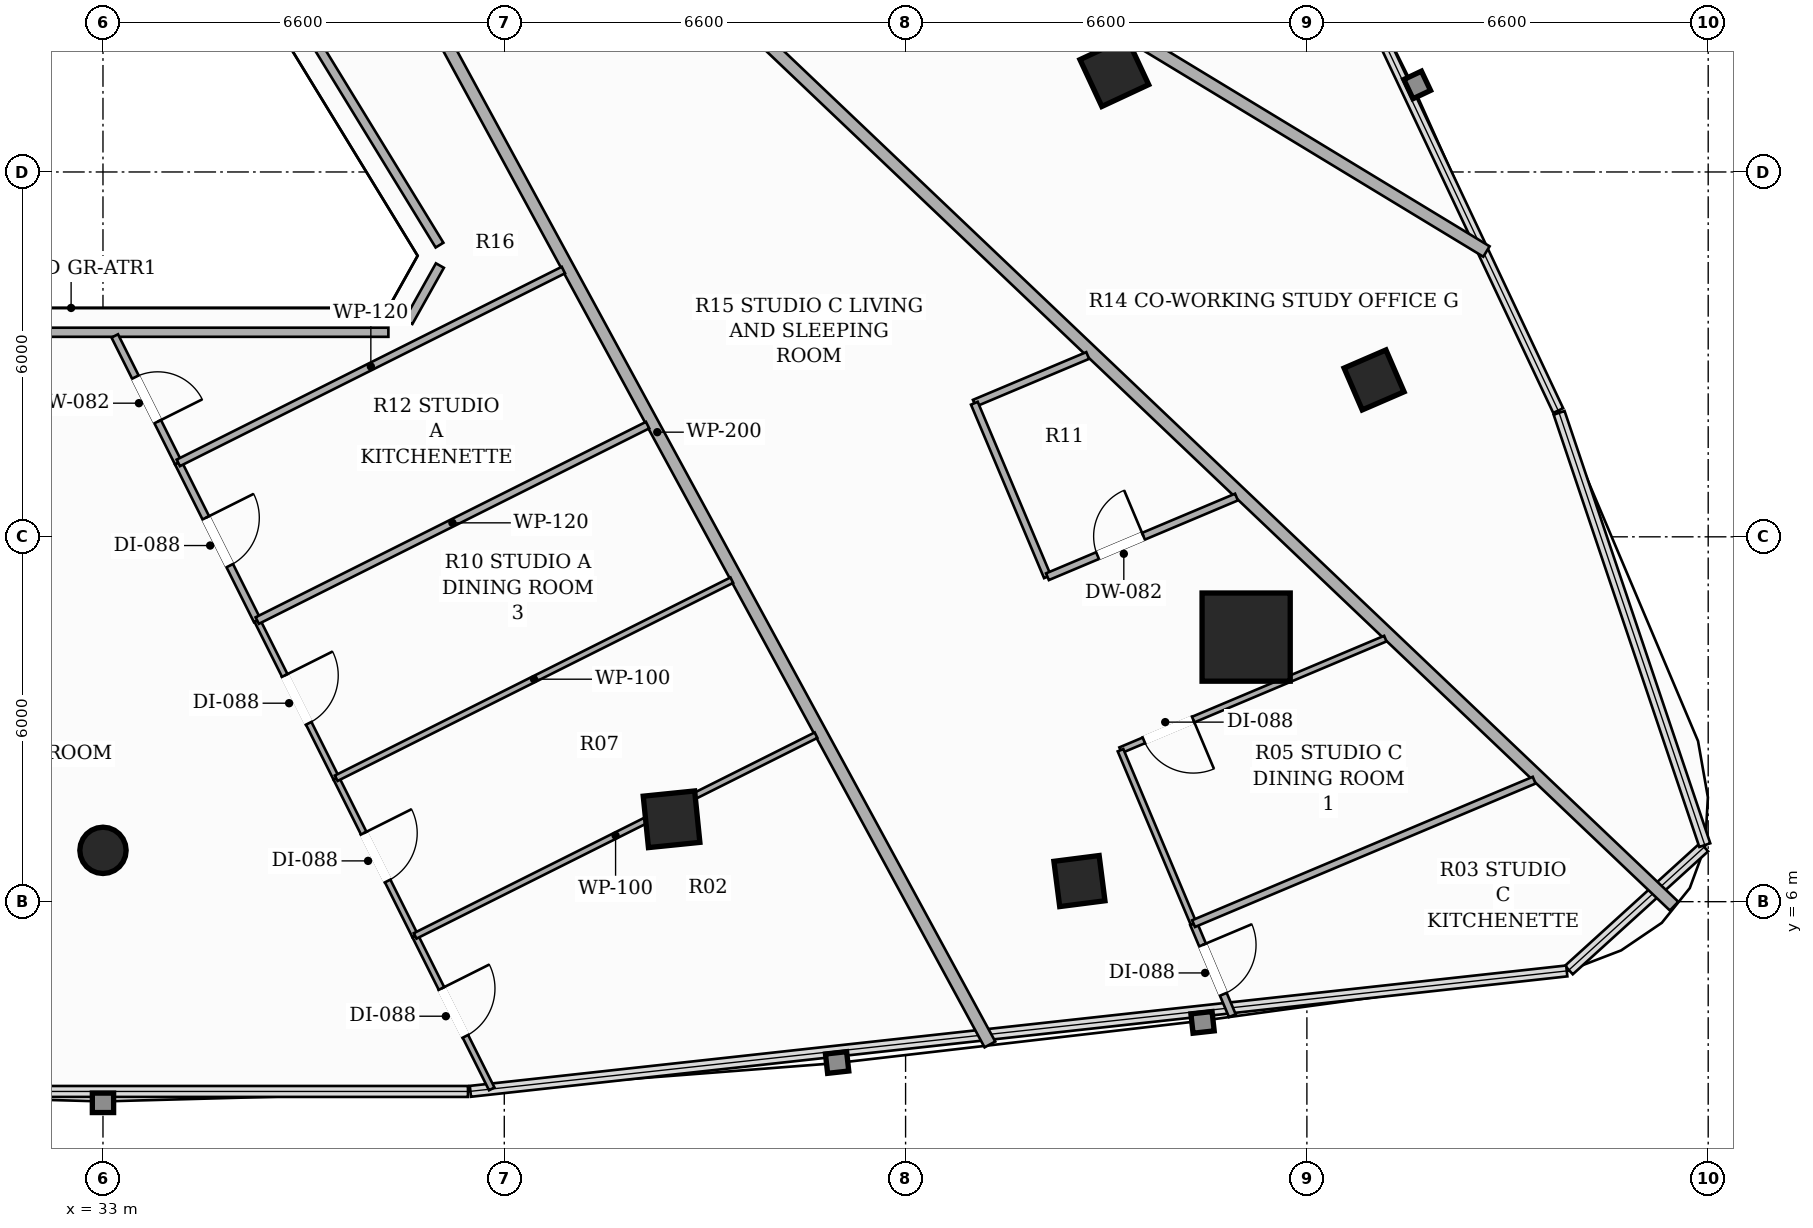
"""IFC4 building model, lengths in metres.
Left out: names, types, materials, properties, quantities, classifications, styles, units other than length and angle.
Written with IfcOpenShell. Run it as: python <this file> out.ifc"""

import sys

from ifc_helpers import new_model, si_unit, direction, frame, frame_2d, origin, origin_2d, place, context, subcontext, project, spatial, rectangle, hollow_rectangle, hollow_circle, extrude, element, fill, save


model = new_model("IFC4")
c1 = context("Model", 3, precision=1e-05, world=origin(), true_north=direction((0.0, 1.0)))
c2 = subcontext(c1, "Body", "Model", "MODEL_VIEW")
j1 = project(units=[si_unit("LENGTHUNIT", "METRE"), si_unit("PLANEANGLEUNIT", "RADIAN")], contexts=[c1])
p1 = place(None, origin())
s1 = spatial("IfcSite", under=j1, at=p1, CompositionType="ELEMENT")
p2 = place(p1, origin())
s2 = spatial("IfcBuilding", under=s1, at=p2, CompositionType="ELEMENT")
p3 = place(p2, frame((0.0, 0.0, 113.3)))
s3 = spatial("IfcBuildingStorey", under=s2, at=p3, CompositionType="ELEMENT", Elevation=113.3)
p4 = place(p3, frame((51.801, 10.351, 0.0), z_axis=(0.0, 0.0, 1.0), x_axis=(1.0, 0.0, 0.0)))
e1 = element("IfcColumn", 1, at=p4, inside=s3, PredefinedType="COLUMN", context=c2, shape_type="SweptSolid", body=[
    extrude(hollow_rectangle(XDim=1.45, YDim=1.45, WallThickness=0.045, at=origin_2d()), origin(), (0.0, 0.0, 1.0), 3.3),
])
p5 = place(p3, frame((33.0, 6.844, 0.0), z_axis=(0.0, 0.0, 1.0), x_axis=(1.0, 0.0, 0.0)))
e2 = element("IfcColumn", 2, at=p5, inside=s3, PredefinedType="COLUMN", context=c2, shape_type="SweptSolid", body=[
    extrude(hollow_circle(Radius=0.381, WallThickness=0.022, at=origin_2d()), origin(), (0.0, 0.0, 1.0), 3.3),
])
for number, where, z_axis, x_axis in (
    (3, (42.351, 7.355, 0.0), (0.0, 0.0, 1.0), (0.995, 0.101, 0.0)),
    (4, (49.633, 19.642, 0.0), (0.0, 0.0, 1.0), (-0.423, 0.906, 0.0)),
):
    element("IfcColumn", number, at=place(p3, frame(where, z_axis=z_axis, x_axis=x_axis)), inside=s3, PredefinedType="COLUMN", context=c2, shape_type="SweptSolid", body=[
        extrude(hollow_rectangle(XDim=0.85, YDim=0.85, WallThickness=0.028, at=origin_2d()), origin(), (0.0, 0.0, 1.0), 3.3),
    ])
for number, where, z_axis, x_axis in (
    (5, (49.059, 6.339, 0.0), (0.0, 0.0, 1.0), (0.992, 0.127, 0.0)),
    (6, (53.905, 14.58, 0.0), (0.0, 0.0, 1.0), (-0.397, 0.918, 0.0)),
):
    element("IfcColumn", number, at=place(p3, frame(where, z_axis=z_axis, x_axis=x_axis)), inside=s3, PredefinedType="COLUMN", context=c2, shape_type="SweptSolid", body=[
        extrude(hollow_rectangle(XDim=0.75, YDim=0.75, WallThickness=0.025, at=origin_2d()), origin(), (0.0, 0.0, 1.0), 3.3),
    ])
p6 = place(p3, frame((34.257, 23.79, 0.0), z_axis=(0.0, 0.0, 1.0), x_axis=(0.521839061235, -0.853043957935, 0.0)))
e7 = element("IfcWall", 7, at=p6, inside=s3, PredefinedType="PARTITIONING", context=c2, shape_type="SweptSolid", body=[
    extrude(rectangle(XDim=8.198, YDim=0.15, at=frame_2d((4.099, 0.0))), origin(), (0.0, 0.0, 1.0), 2.721),
])
p7 = place(p3, frame((38.541, 16.461, 0.0), z_axis=(0.0, 0.0, 1.0), x_axis=(-0.488631416095, -0.872490308946, 0.0)))
e8 = element("IfcWall", 8, at=p7, inside=s3, PredefinedType="PARTITIONING", context=c2, shape_type="SweptSolid", body=[
    extrude(rectangle(XDim=1.06, YDim=0.15, at=frame_2d((0.53, 0.0))), origin(), (0.0, 0.0, 1.0), 3.06),
])
p8 = place(p3, frame((37.694, 15.364, 0.0), z_axis=(0.0, 0.0, 1.0), x_axis=(-1.0, 0.0, 0.0)))
e9 = element("IfcWall", 9, at=p8, inside=s3, PredefinedType="PARTITIONING", context=c2, shape_type="SweptSolid", body=[
    extrude(rectangle(XDim=9.388, YDim=0.15, at=frame_2d((4.694, 0.0))), origin(), (0.0, 0.0, 1.0), 2.721),
])
p9 = place(p3, frame((36.646, 23.79, 0.0), z_axis=(0.0, 0.0, 1.0), x_axis=(0.477391569207, -0.878690667784, 0.0)))
e10 = element("IfcWall", 10, at=p9, inside=s3, PredefinedType="PARTITIONING", context=c2, shape_type="SweptSolid", body=[
    extrude(rectangle(XDim=22.918, YDim=0.2, at=frame_2d((11.459, 0.0))), origin(), (0.0, 0.0, 1.0), 2.413),
])
p10 = place(p3, frame((40.056, 23.79, 0.0), z_axis=(0.0, 0.0, 1.0), x_axis=(0.724633427165, -0.68913452695, 0.0)))
e11 = element("IfcWall", 11, at=p10, inside=s3, PredefinedType="PARTITIONING", context=c2, shape_type="SweptSolid", body=[
    extrude(rectangle(XDim=25.921, YDim=0.2, at=frame_2d((12.96, 0.0))), origin(), (0.0, 0.0, 1.0), 2.413),
])
p11 = place(p3, frame((55.753, 16.692, 0.0), z_axis=(0.0, 0.0, 1.0), x_axis=(-0.85489976131, 0.518793213248, 0.0)))
e12 = element("IfcWall", 12, at=p11, inside=s3, PredefinedType="PARTITIONING", context=c2, shape_type="SweptSolid", body=[
    extrude(rectangle(XDim=15.608, YDim=0.2, at=frame_2d((7.804, 0.0))), origin(), (0.0, 0.0, 1.0), 2.413),
])
p12 = place(p3, frame((33.194, 15.304, 0.0), z_axis=(0.0, 0.0, 1.0), x_axis=(0.447548179666, -0.894259820677, 0.0)))
e13 = element("IfcWall", 13, at=p12, inside=s3, PredefinedType="PARTITIONING", context=c2, shape_type="SweptSolid", body=[
    extrude(rectangle(XDim=2.335, YDim=0.12, at=frame_2d((1.167, 0.0))), origin(), (0.0, 0.0, 1.0), 2.721),
])
p13 = place(p12, frame((0.757, 0.0, 0.0)))
e14 = element("IfcOpeningElement", 14, at=p13, cuts=e13, PredefinedType="OPENING", context=c2, shape_type="SweptSolid", body=[
    extrude(rectangle(XDim=0.82, YDim=2.1, at=frame_2d((0.41, 1.05))), frame((0.0, 0.07, 0.0), z_axis=(0.0, -1.0, 0.0), x_axis=(1.0, 0.0, 0.0)), (0.0, 0.0, 1.0), 0.14),
])
p14 = place(p3, frame((34.239, 13.216, 0.0), z_axis=(0.0, 0.0, 1.0), x_axis=(0.447651342751, -0.894208183441, 0.0)))
e15 = element("IfcWall", 15, at=p14, inside=s3, PredefinedType="PARTITIONING", context=c2, shape_type="SweptSolid", body=[
    extrude(rectangle(XDim=2.9, YDim=0.12, at=frame_2d((1.45, 0.0))), origin(), (0.0, 0.0, 1.0), 3.06),
])
p15 = place(p14, frame((1.01, 0.0, 0.0)))
e16 = element("IfcOpeningElement", 16, at=p15, cuts=e15, PredefinedType="OPENING", context=c2, shape_type="SweptSolid", body=[
    extrude(rectangle(XDim=0.88, YDim=2.1, at=frame_2d((0.44, 1.05))), frame((0.0, 0.07, 0.0), z_axis=(0.0, -1.0, 0.0), x_axis=(1.0, 0.0, 0.0)), (0.0, 0.0, 1.0), 0.14),
])
p16 = place(p3, frame((38.134, 5.437, 0.0), z_axis=(0.0, 0.0, 1.0), x_axis=(0.447768773835, -0.894149386388, 0.0)))
e17 = element("IfcWall", 17, at=p16, inside=s3, PredefinedType="PARTITIONING", context=c2, shape_type="SweptSolid", body=[
    extrude(rectangle(XDim=2.814, YDim=0.1, at=frame_2d((1.407, 0.0))), origin(), (0.0, 0.0, 1.0), 3.06),
])
p17 = place(p16, frame((0.967, 0.0, 0.0)))
e18 = element("IfcOpeningElement", 18, at=p17, cuts=e17, PredefinedType="OPENING", context=c2, shape_type="SweptSolid", body=[
    extrude(rectangle(XDim=0.88, YDim=2.1, at=frame_2d((0.44, 1.05))), frame((0.0, 0.06, 0.0), z_axis=(0.0, -1.0, 0.0), x_axis=(1.0, 0.0, 0.0)), (0.0, 0.0, 1.0), 0.12),
])
p18 = place(p3, frame((36.836, 8.03, 0.0), z_axis=(0.0, 0.0, 1.0), x_axis=(0.447651342751, -0.894208183441, 0.0)))
e19 = element("IfcWall", 19, at=p18, inside=s3, PredefinedType="PARTITIONING", context=c2, shape_type="SweptSolid", body=[
    extrude(rectangle(XDim=2.9, YDim=0.1, at=frame_2d((1.45, 0.0))), origin(), (0.0, 0.0, 1.0), 2.413),
])
p19 = place(p18, frame((1.01, 0.0, 0.0)))
e20 = element("IfcOpeningElement", 20, at=p19, cuts=e19, PredefinedType="OPENING", context=c2, shape_type="SweptSolid", body=[
    extrude(rectangle(XDim=0.88, YDim=2.1, at=frame_2d((0.44, 1.05))), frame((0.0, 0.06, 0.0), z_axis=(0.0, -1.0, 0.0), x_axis=(1.0, 0.0, 0.0)), (0.0, 0.0, 1.0), 0.12),
])
p20 = place(p3, frame((35.537, 10.623, 0.0), z_axis=(0.0, 0.0, 1.0), x_axis=(0.447853271476, -0.894107066983, 0.0)))
e21 = element("IfcWall", 21, at=p20, inside=s3, PredefinedType="PARTITIONING", context=c2, shape_type="SweptSolid", body=[
    extrude(rectangle(XDim=2.9, YDim=0.1, at=frame_2d((1.45, 0.0))), origin(), (0.0, 0.0, 1.0), 3.06),
])
p21 = place(p20, frame((1.01, 0.0, 0.0)))
e22 = element("IfcOpeningElement", 22, at=p21, cuts=e21, PredefinedType="OPENING", context=c2, shape_type="SweptSolid", body=[
    extrude(rectangle(XDim=0.88, YDim=2.1, at=frame_2d((0.44, 1.05))), frame((0.0, 0.06, 0.0), z_axis=(0.0, -1.0, 0.0), x_axis=(1.0, 0.0, 0.0)), (0.0, 0.0, 1.0), 0.12),
])
p22 = place(p3, frame((40.572, 16.387, 0.0), z_axis=(0.0, 0.0, 1.0), x_axis=(-0.894178861749, -0.447709909653, 0.0)))
e23 = element("IfcWall", 23, at=p22, inside=s3, PredefinedType="PARTITIONING", context=c2, shape_type="SweptSolid", body=[
    extrude(rectangle(XDim=7.083, YDim=0.12, at=frame_2d((3.541, 0.0))), origin(), (0.0, 0.0, 1.0), 2.721),
])
p23 = place(p3, frame((41.957, 13.837, 0.0), z_axis=(0.0, 0.0, 1.0), x_axis=(-0.894209449688, -0.447648813344, 0.0)))
e24 = element("IfcWall", 24, at=p23, inside=s3, PredefinedType="PARTITIONING", context=c2, shape_type="SweptSolid", body=[
    extrude(rectangle(XDim=7.179, YDim=0.12, at=frame_2d((3.59, 0.0))), origin(), (0.0, 0.0, 1.0), 2.721),
])
p24 = place(p3, frame((38.134, 5.437, 0.0), z_axis=(0.0, 0.0, 1.0), x_axis=(0.894182030014, 0.447703581849, 0.0)))
e25 = element("IfcWall", 25, at=p24, inside=s3, PredefinedType="PARTITIONING", context=c2, shape_type="SweptSolid", body=[
    extrude(rectangle(XDim=7.373, YDim=0.1, at=frame_2d((3.687, 0.0))), origin(), (0.0, 0.0, 1.0), 2.413),
])
p25 = place(p3, frame((36.836, 8.03, 0.0), z_axis=(0.0, 0.0, 1.0), x_axis=(0.894205618721, 0.447656465884, 0.0)))
e26 = element("IfcWall", 26, at=p25, inside=s3, PredefinedType="PARTITIONING", context=c2, shape_type="SweptSolid", body=[
    extrude(rectangle(XDim=7.276, YDim=0.1, at=frame_2d((3.638, 0.0))), origin(), (0.0, 0.0, 1.0), 2.721),
])
p26 = place(p3, frame((49.195, 14.982, 0.0), z_axis=(0.0, 0.0, 1.0), x_axis=(-0.921624013763, -0.38808398222, 0.0)))
e27 = element("IfcWall", 27, at=p26, inside=s3, PredefinedType="PARTITIONING", context=c2, shape_type="SweptSolid", body=[
    extrude(rectangle(XDim=2.022, YDim=0.12, at=frame_2d((1.011, 0.0))), origin(), (0.0, 0.0, 1.0), 2.492),
])
p27 = place(p3, frame((47.331, 14.197, 0.0), z_axis=(0.0, 0.0, 1.0), x_axis=(0.388229743903, -0.921562621827, 0.0)))
e28 = element("IfcWall", 28, at=p27, inside=s3, PredefinedType="PARTITIONING", context=c2, shape_type="SweptSolid", body=[
    extrude(rectangle(XDim=3.096, YDim=0.12, at=frame_2d((1.548, 0.0))), origin(), (0.0, 0.0, 1.0), 3.06),
])
p28 = place(p3, frame((48.533, 11.344, 0.0), z_axis=(0.0, 0.0, 1.0), x_axis=(0.921534547548, 0.388296378653, 0.0)))
e29 = element("IfcWall", 29, at=p28, inside=s3, PredefinedType="PARTITIONING", context=c2, shape_type="SweptSolid", body=[
    extrude(rectangle(XDim=3.374, YDim=0.12, at=frame_2d((1.687, 0.0))), origin(), (0.0, 0.0, 1.0), 2.492),
])
p29 = place(p28, frame((0.894, 0.0, 0.0)))
e30 = element("IfcOpeningElement", 30, at=p29, cuts=e29, PredefinedType="OPENING", context=c2, shape_type="SweptSolid", body=[
    extrude(rectangle(XDim=0.82, YDim=2.1, at=frame_2d((0.41, 1.05))), frame((0.0, 0.07, 0.0), z_axis=(0.0, -1.0, 0.0), x_axis=(1.0, 0.0, 0.0)), (0.0, 0.0, 1.0), 0.14),
])
p30 = place(p3, frame((50.936, 5.639, 0.0), z_axis=(0.0, 0.0, 1.0), x_axis=(0.3883160894, -0.92152624201, 0.0)))
e31 = element("IfcWall", 31, at=p30, inside=s3, PredefinedType="PARTITIONING", context=c2, shape_type="SweptSolid", body=[
    extrude(rectangle(XDim=1.643, YDim=0.12, at=frame_2d((0.821, 0.0))), origin(), (0.0, 0.0, 1.0), 2.619),
])
p31 = place(p30, frame((0.381, 0.0, 0.0)))
e32 = element("IfcOpeningElement", 32, at=p31, cuts=e31, PredefinedType="OPENING", context=c2, shape_type="SweptSolid", body=[
    extrude(rectangle(XDim=0.88, YDim=2.1, at=frame_2d((0.44, 1.05))), frame((0.0, 0.07, 0.0), z_axis=(0.0, -1.0, 0.0), x_axis=(1.0, 0.0, 0.0)), (0.0, 0.0, 1.0), 0.14),
])
p32 = place(p3, frame((54.09, 10.326, 0.0), z_axis=(0.0, 0.0, 1.0), x_axis=(-0.921538100995, -0.388287945234, 0.0)))
e33 = element("IfcWall", 33, at=p32, inside=s3, PredefinedType="PARTITIONING", context=c2, shape_type="SweptSolid", body=[
    extrude(rectangle(XDim=4.726, YDim=0.1, at=frame_2d((2.363, 0.0))), origin(), (0.0, 0.0, 1.0), 2.413),
])
p33 = place(p32, frame((3.429, 0.0, 0.0)))
e34 = element("IfcOpeningElement", 34, at=p33, cuts=e33, PredefinedType="OPENING", context=c2, shape_type="SweptSolid", body=[
    extrude(rectangle(XDim=0.88, YDim=2.1, at=frame_2d((0.44, 1.05))), frame((0.0, 0.06, 0.0), z_axis=(0.0, -1.0, 0.0), x_axis=(1.0, 0.0, 0.0)), (0.0, 0.0, 1.0), 0.12),
])
p34 = place(p3, frame((49.735, 8.491, 0.0), z_axis=(0.0, 0.0, 1.0), x_axis=(0.388074634892, -0.921627949746, 0.0)))
e35 = element("IfcWall", 35, at=p34, inside=s3, PredefinedType="PARTITIONING", context=c2, shape_type="SweptSolid", body=[
    extrude(rectangle(XDim=3.094, YDim=0.1, at=frame_2d((1.547, 0.0))), origin(), (0.0, 0.0, 1.0), 2.413),
])
p35 = place(p3, frame((50.936, 5.639, 0.0), z_axis=(0.0, 0.0, 1.0), x_axis=(0.921613448603, 0.388109071466, 0.0)))
e36 = element("IfcWall", 36, at=p35, inside=s3, PredefinedType="PARTITIONING", context=c2, shape_type="SweptSolid", body=[
    extrude(rectangle(XDim=6.079, YDim=0.12, at=frame_2d((3.039, 0.0))), origin(), (0.0, 0.0, 1.0), 2.619),
])
p36 = place(p13, origin())
e37 = element("IfcDoor", 37, at=p36, inside=s3, OperationType="SINGLE_SWING_RIGHT", PredefinedType="DOOR", context=c2, shape_type="SweptSolid", body=[
    extrude(rectangle(XDim=0.82, YDim=2.1, at=frame_2d((0.41, 1.05))), frame((0.0, 0.025, 0.0), z_axis=(0.0, -1.0, 0.0), x_axis=(1.0, 0.0, 0.0)), (0.0, 0.0, 1.0), 0.05),
])
fill(e14, e37)
p37 = place(p15, origin())
e38 = element("IfcDoor", 38, at=p37, inside=s3, OperationType="SINGLE_SWING_LEFT", PredefinedType="DOOR", context=c2, shape_type="SweptSolid", body=[
    extrude(rectangle(XDim=0.88, YDim=2.1, at=frame_2d((0.44, 1.05))), frame((0.0, 0.025, 0.0), z_axis=(0.0, -1.0, 0.0), x_axis=(1.0, 0.0, 0.0)), (0.0, 0.0, 1.0), 0.05),
])
fill(e16, e38)
p38 = place(p17, origin())
e39 = element("IfcDoor", 39, at=p38, inside=s3, OperationType="SINGLE_SWING_LEFT", PredefinedType="DOOR", context=c2, shape_type="SweptSolid", body=[
    extrude(rectangle(XDim=0.88, YDim=2.1, at=frame_2d((0.44, 1.05))), frame((0.0, 0.025, 0.0), z_axis=(0.0, -1.0, 0.0), x_axis=(1.0, 0.0, 0.0)), (0.0, 0.0, 1.0), 0.05),
])
fill(e18, e39)
p39 = place(p19, origin())
e40 = element("IfcDoor", 40, at=p39, inside=s3, OperationType="SINGLE_SWING_LEFT", PredefinedType="DOOR", context=c2, shape_type="SweptSolid", body=[
    extrude(rectangle(XDim=0.88, YDim=2.1, at=frame_2d((0.44, 1.05))), frame((0.0, 0.025, 0.0), z_axis=(0.0, -1.0, 0.0), x_axis=(1.0, 0.0, 0.0)), (0.0, 0.0, 1.0), 0.05),
])
fill(e20, e40)
p40 = place(p21, origin())
e41 = element("IfcDoor", 41, at=p40, inside=s3, OperationType="SINGLE_SWING_LEFT", PredefinedType="DOOR", context=c2, shape_type="SweptSolid", body=[
    extrude(rectangle(XDim=0.88, YDim=2.1, at=frame_2d((0.44, 1.05))), frame((0.0, 0.025, 0.0), z_axis=(0.0, -1.0, 0.0), x_axis=(1.0, 0.0, 0.0)), (0.0, 0.0, 1.0), 0.05),
])
fill(e22, e41)
p41 = place(p29, origin())
e42 = element("IfcDoor", 42, at=p41, inside=s3, OperationType="SINGLE_SWING_RIGHT", PredefinedType="DOOR", context=c2, shape_type="SweptSolid", body=[
    extrude(rectangle(XDim=0.82, YDim=2.1, at=frame_2d((0.41, 1.05))), frame((0.0, 0.025, 0.0), z_axis=(0.0, -1.0, 0.0), x_axis=(1.0, 0.0, 0.0)), (0.0, 0.0, 1.0), 0.05),
])
fill(e30, e42)
p42 = place(p31, origin())
e43 = element("IfcDoor", 43, at=p42, inside=s3, OperationType="SINGLE_SWING_LEFT", PredefinedType="DOOR", context=c2, shape_type="SweptSolid", body=[
    extrude(rectangle(XDim=0.88, YDim=2.1, at=frame_2d((0.44, 1.05))), frame((0.0, 0.025, 0.0), z_axis=(0.0, -1.0, 0.0), x_axis=(1.0, 0.0, 0.0)), (0.0, 0.0, 1.0), 0.05),
])
fill(e32, e43)
p43 = place(p33, origin())
e44 = element("IfcDoor", 44, at=p43, inside=s3, OperationType="SINGLE_SWING_LEFT", PredefinedType="DOOR", context=c2, shape_type="SweptSolid", body=[
    extrude(rectangle(XDim=0.88, YDim=2.1, at=frame_2d((0.44, 1.05))), frame((0.0, 0.025, 0.0), z_axis=(0.0, -1.0, 0.0), x_axis=(1.0, 0.0, 0.0)), (0.0, 0.0, 1.0), 0.05),
])
fill(e34, e44)
save(model, sys.argv[1])
